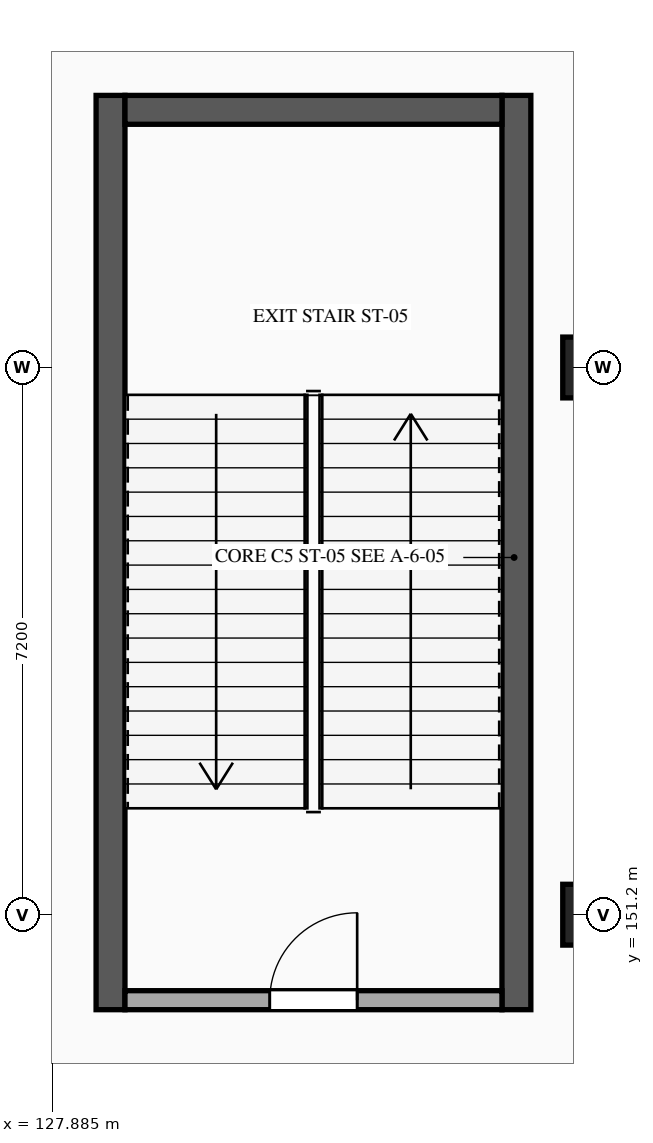
"""IFC4 building model, lengths in metres.
Left out: names, types, materials, properties, quantities, classifications, styles, units other than length and angle.
Written with IfcOpenShell. Run it as: python <this file> out.ifc"""

import sys

from ifc_helpers import new_model, si_unit, direction, frame, frame_2d, origin, origin_2d, place, context, subcontext, project, spatial, rectangle, extrude, element, fill, save


model = new_model("IFC4")
c1 = context("Model", 3, precision=1e-05, world=origin(), true_north=direction((0.0, 1.0)))
c2 = subcontext(c1, "Body", "Model", "MODEL_VIEW")
j1 = project(units=[si_unit("LENGTHUNIT", "METRE"), si_unit("PLANEANGLEUNIT", "RADIAN")], contexts=[c1])
p1 = place(None, origin())
s1 = spatial("IfcSite", under=j1, at=p1, CompositionType="ELEMENT")
p2 = place(p1, origin())
s2 = spatial("IfcBuilding", under=s1, at=p2, CompositionType="ELEMENT")
p3 = place(p2, frame((0.0, 0.0, -5.4)))
s3 = spatial("IfcBuildingStorey", under=s2, at=p3, CompositionType="ELEMENT", Elevation=-5.4)
for number, where, z_axis, x_axis in (
    (1, (135.0, 151.2, 0.0), (0.0, 0.0, 1.0), (1.0, 0.0, 0.0)),
    (2, (135.0, 158.4, 0.0), (0.0, 0.0, 1.0), (1.0, 0.0, 0.0)),
):
    element("IfcColumn", number, at=place(p3, frame(where, z_axis=z_axis, x_axis=x_axis)), inside=s3, PredefinedType="COLUMN", context=c2, shape_type="SweptSolid", body=[
        extrude(rectangle(XDim=0.8, YDim=0.8, at=origin_2d()), origin(), (0.0, 0.0, 1.0), 5.4),
    ])
for number, where, z_axis, x_axis in (
    (3, (128.65, 149.95, 0.0), (0.0, 0.0, 1.0), (0.0, 1.0, 0.0)),
    (4, (133.99, 161.98, 0.0), (0.0, 0.0, 1.0), (0.0, -1.0, 0.0)),
):
    element("IfcWall", number, at=place(p3, frame(where, z_axis=z_axis, x_axis=x_axis)), inside=s3, PredefinedType="SHEAR", context=c2, shape_type="SweptSolid", body=[
        extrude(rectangle(XDim=12.03, YDim=0.38, at=frame_2d((6.015, 0.0))), origin(), (0.0, 0.0, 1.0), 5.08),
    ])
p4 = place(p3, frame((128.84, 161.79, 0.0), z_axis=(0.0, 0.0, 1.0), x_axis=(1.0, 0.0, 0.0)))
e5 = element("IfcWall", 5, at=p4, inside=s3, PredefinedType="SHEAR", context=c2, shape_type="SweptSolid", body=[
    extrude(rectangle(XDim=4.96, YDim=0.38, at=frame_2d((2.48, 0.0))), origin(), (0.0, 0.0, 1.0), 5.08),
])
p5 = place(p3, frame((128.84, 150.075, 0.0), z_axis=(0.0, 0.0, 1.0), x_axis=(1.0, 0.0, 0.0)))
e6 = element("IfcWall", 6, at=p5, inside=s3, PredefinedType="STANDARD", context=c2, shape_type="SweptSolid", body=[
    extrude(rectangle(XDim=4.96, YDim=0.25, at=frame_2d((2.48, 0.0))), origin(), (0.0, 0.0, 1.0), 4.95),
])
p6 = place(p5, frame((1.905, 0.0, 0.0)))
e7 = element("IfcOpeningElement", 7, at=p6, cuts=e6, PredefinedType="OPENING", context=c2, shape_type="SweptSolid", body=[
    extrude(rectangle(XDim=1.15, YDim=2.2, at=frame_2d((0.575, 1.1))), frame((0.0, 0.135, 0.0), z_axis=(0.0, -1.0, 0.0), x_axis=(1.0, 0.0, 0.0)), (0.0, 0.0, 1.0), 0.27),
])
p7 = place(p6, origin())
e8 = element("IfcDoor", 8, at=p7, inside=s3, OperationType="SINGLE_SWING_RIGHT", PredefinedType="DOOR", context=c2, shape_type="SweptSolid", body=[
    extrude(rectangle(XDim=1.15, YDim=2.2, at=frame_2d((0.575, 1.1))), frame((0.0, 0.025, 0.0), z_axis=(0.0, -1.0, 0.0), x_axis=(1.0, 0.0, 0.0)), (0.0, 0.0, 1.0), 0.05),
])
fill(e7, e8)
save(model, sys.argv[1])
